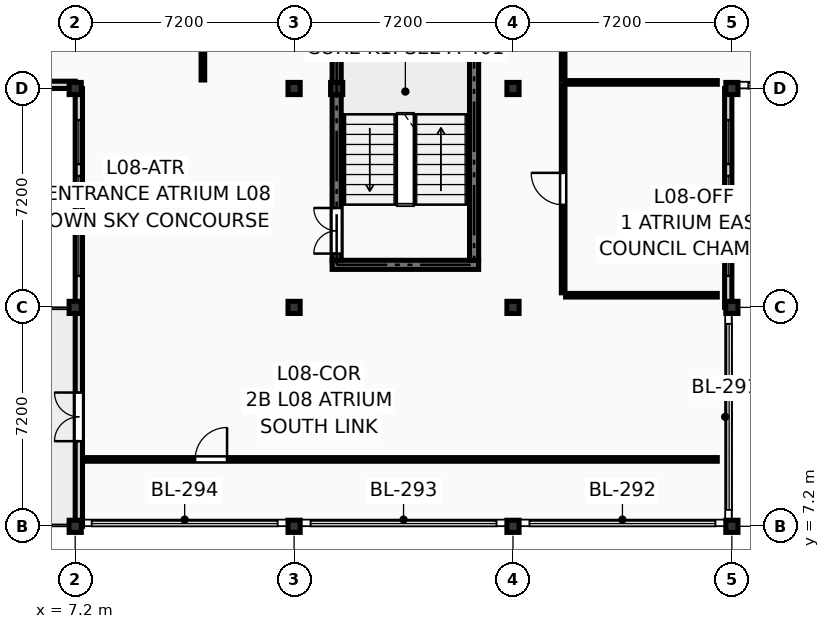
"""IFC4 building model, lengths in metres.
Left out: names, types, materials, properties, quantities, classifications, styles, units other than length and angle.
Written with IfcOpenShell. Run it as: python <this file> out.ifc"""

import sys

from ifc_helpers import new_model, si_unit, direction, frame, frame_2d, origin, origin_2d, place, context, subcontext, project, spatial, rectangle, extrude, element, fill, save


model = new_model("IFC4")
c1 = context("Model", 3, precision=1e-05, world=origin(), true_north=direction((0.0, 1.0)))
c2 = subcontext(c1, "Body", "Model", "MODEL_VIEW")
j1 = project(units=[si_unit("LENGTHUNIT", "METRE"), si_unit("PLANEANGLEUNIT", "RADIAN")], contexts=[c1])
p1 = place(None, origin())
s1 = spatial("IfcSite", under=j1, at=p1, CompositionType="ELEMENT")
p2 = place(p1, origin())
s2 = spatial("IfcBuilding", under=s1, at=p2, CompositionType="ELEMENT")
p3 = place(p2, frame((0.0, 0.0, 29.7)))
s3 = spatial("IfcBuildingStorey", under=s2, at=p3, CompositionType="ELEMENT", Elevation=29.7)
for number, where, z_axis, x_axis in (
    (1, (7.2, 7.2, 0.0), (0.0, 0.0, 1.0), (1.0, 0.0, 0.0)),
    (2, (7.2, 14.4, 0.0), (0.0, 0.0, 1.0), (1.0, 0.0, 0.0)),
    (3, (7.2, 21.6, 0.0), (0.0, 0.0, 1.0), (1.0, 0.0, 0.0)),
    (4, (14.4, 7.2, 0.0), (0.0, 0.0, 1.0), (1.0, 0.0, 0.0)),
    (5, (14.4, 14.4, 0.0), (0.0, 0.0, 1.0), (1.0, 0.0, 0.0)),
    (6, (14.4, 21.6, 0.0), (0.0, 0.0, 1.0), (1.0, 0.0, 0.0)),
    (7, (15.8, 21.6, 0.0), (0.0, 0.0, 1.0), (1.0, 0.0, 0.0)),
    (8, (21.6, 7.2, 0.0), (0.0, 0.0, 1.0), (1.0, 0.0, 0.0)),
    (9, (21.6, 14.4, 0.0), (0.0, 0.0, 1.0), (1.0, 0.0, 0.0)),
    (10, (21.6, 21.6, 0.0), (0.0, 0.0, 1.0), (1.0, 0.0, 0.0)),
    (11, (28.8, 7.2, 0.0), (0.0, 0.0, 1.0), (1.0, 0.0, 0.0)),
    (12, (28.8, 14.4, 0.0), (0.0, 0.0, 1.0), (1.0, 0.0, 0.0)),
    (13, (28.8, 21.6, 0.0), (0.0, 0.0, 1.0), (1.0, 0.0, 0.0)),
):
    element("IfcColumn", number, at=place(p3, frame(where, z_axis=z_axis, x_axis=x_axis)), inside=s3, PredefinedType="COLUMN", context=c2, shape_type="SweptSolid", body=[
        extrude(rectangle(XDim=0.4, YDim=0.4, at=origin_2d()), origin(), (0.0, 0.0, 1.0), 3.6),
    ])
p4 = place(p3, frame((7.32, 7.2, 0.0), z_axis=(0.0, 0.0, 1.0), x_axis=(0.0, 1.0, 0.0)))
e14 = element("IfcWall", 14, at=p4, inside=s3, PredefinedType="SOLIDWALL", context=c2, shape_type="SweptSolid", body=[
    extrude(rectangle(XDim=7.2, YDim=0.24, at=frame_2d((3.6, 0.0))), origin(), (0.0, 0.0, 1.0), 2.85),
])
p5 = place(p4, frame((2.8, 0.0, 0.0)))
e15 = element("IfcOpeningElement", 15, at=p5, cuts=e14, PredefinedType="OPENING", context=c2, shape_type="SweptSolid", body=[
    extrude(rectangle(XDim=1.6, YDim=2.25, at=frame_2d((0.8, 1.125))), frame((0.0, 0.132, 0.0), z_axis=(0.0, -1.0, 0.0), x_axis=(1.0, 0.0, 0.0)), (0.0, 0.0, 1.0), 0.264),
])
p6 = place(p3, frame((7.32, 14.4, 0.0), z_axis=(0.0, 0.0, 1.0), x_axis=(0.0, 1.0, 0.0)))
e16 = element("IfcWall", 16, at=p6, inside=s3, PredefinedType="SOLIDWALL", context=c2, shape_type="SweptSolid", body=[
    extrude(rectangle(XDim=7.2, YDim=0.24, at=frame_2d((3.6, 0.0))), origin(), (0.0, 0.0, 1.0), 2.85),
])
p7 = place(p6, frame((1.038, 0.0, 0.18)))
e17 = element("IfcOpeningElement", 17, at=p7, cuts=e16, PredefinedType="OPENING", context=c2, shape_type="SweptSolid", body=[
    extrude(rectangle(XDim=1.45, YDim=2.5, at=frame_2d((0.725, 1.25))), frame((0.0, 0.132, 0.0), z_axis=(0.0, -1.0, 0.0), x_axis=(1.0, 0.0, 0.0)), (0.0, 0.0, 1.0), 0.264),
])
p8 = place(p6, frame((2.875, 0.0, 0.18)))
e18 = element("IfcOpeningElement", 18, at=p8, cuts=e16, PredefinedType="OPENING", context=c2, shape_type="SweptSolid", body=[
    extrude(rectangle(XDim=1.45, YDim=2.5, at=frame_2d((0.725, 1.25))), frame((0.0, 0.132, 0.0), z_axis=(0.0, -1.0, 0.0), x_axis=(1.0, 0.0, 0.0)), (0.0, 0.0, 1.0), 0.264),
])
p9 = place(p6, frame((4.712, 0.0, 0.18)))
e19 = element("IfcOpeningElement", 19, at=p9, cuts=e16, PredefinedType="OPENING", context=c2, shape_type="SweptSolid", body=[
    extrude(rectangle(XDim=1.45, YDim=2.5, at=frame_2d((0.725, 1.25))), frame((0.0, 0.132, 0.0), z_axis=(0.0, -1.0, 0.0), x_axis=(1.0, 0.0, 0.0)), (0.0, 0.0, 1.0), 0.264),
])
p10 = place(p3, frame((1.8, 21.72, 0.0), z_axis=(0.0, 0.0, 1.0), x_axis=(1.0, 0.0, 0.0)))
e20 = element("IfcWall", 20, at=p10, inside=s3, PredefinedType="SOLIDWALL", context=c2, shape_type="SweptSolid", body=[
    extrude(rectangle(XDim=5.4, YDim=0.24, at=frame_2d((2.7, 0.0))), origin(), (0.0, 0.0, 1.0), 2.706),
])
p11 = place(p10, frame((1.15, 0.0, 0.18)))
e21 = element("IfcOpeningElement", 21, at=p11, cuts=e20, PredefinedType="OPENING", context=c2, shape_type="SweptSolid", body=[
    extrude(rectangle(XDim=1.3, YDim=2.35, at=frame_2d((0.65, 1.175))), frame((0.0, 0.132, 0.0), z_axis=(0.0, -1.0, 0.0), x_axis=(1.0, 0.0, 0.0)), (0.0, 0.0, 1.0), 0.264),
])
p12 = place(p10, frame((2.95, 0.0, 0.18)))
e22 = element("IfcOpeningElement", 22, at=p12, cuts=e20, PredefinedType="OPENING", context=c2, shape_type="SweptSolid", body=[
    extrude(rectangle(XDim=1.3, YDim=2.35, at=frame_2d((0.65, 1.175))), frame((0.0, 0.132, 0.0), z_axis=(0.0, -1.0, 0.0), x_axis=(1.0, 0.0, 0.0)), (0.0, 0.0, 1.0), 0.264),
])
p13 = place(p3, frame((28.68, 14.4, 0.0), z_axis=(0.0, 0.0, 1.0), x_axis=(0.0, 1.0, 0.0)))
e23 = element("IfcWall", 23, at=p13, inside=s3, PredefinedType="SOLIDWALL", context=c2, shape_type="SweptSolid", body=[
    extrude(rectangle(XDim=7.2, YDim=0.24, at=frame_2d((3.6, 0.0))), origin(), (0.0, 0.0, 1.0), 2.85),
])
p14 = place(p13, frame((1.038, 0.0, 0.18)))
e24 = element("IfcOpeningElement", 24, at=p14, cuts=e23, PredefinedType="OPENING", context=c2, shape_type="SweptSolid", body=[
    extrude(rectangle(XDim=1.45, YDim=2.5, at=frame_2d((0.725, 1.25))), frame((0.0, 0.132, 0.0), z_axis=(0.0, -1.0, 0.0), x_axis=(1.0, 0.0, 0.0)), (0.0, 0.0, 1.0), 0.264),
])
p15 = place(p13, frame((2.875, 0.0, 0.18)))
e25 = element("IfcOpeningElement", 25, at=p15, cuts=e23, PredefinedType="OPENING", context=c2, shape_type="SweptSolid", body=[
    extrude(rectangle(XDim=1.45, YDim=2.5, at=frame_2d((0.725, 1.25))), frame((0.0, 0.132, 0.0), z_axis=(0.0, -1.0, 0.0), x_axis=(1.0, 0.0, 0.0)), (0.0, 0.0, 1.0), 0.264),
])
p16 = place(p13, frame((4.712, 0.0, 0.18)))
e26 = element("IfcOpeningElement", 26, at=p16, cuts=e23, PredefinedType="OPENING", context=c2, shape_type="SweptSolid", body=[
    extrude(rectangle(XDim=1.45, YDim=2.5, at=frame_2d((0.725, 1.25))), frame((0.0, 0.132, 0.0), z_axis=(0.0, -1.0, 0.0), x_axis=(1.0, 0.0, 0.0)), (0.0, 0.0, 1.0), 0.264),
])
p17 = place(p3, frame((15.65, 15.8, 0.0), z_axis=(0.0, 0.0, 1.0), x_axis=(1.0, 0.0, 0.0)))
e27 = element("IfcWall", 27, at=p17, inside=s3, PredefinedType="SHEAR", context=c2, shape_type="SweptSolid", body=[
    extrude(rectangle(XDim=4.82, YDim=0.3, at=frame_2d((2.41, 0.0))), origin(), (0.0, 0.0, 1.0), 3.4),
])
p18 = place(p3, frame((15.8, 15.95, 0.0), z_axis=(0.0, 0.0, 1.0), x_axis=(0.0, 1.0, 0.0)))
e28 = element("IfcWall", 28, at=p18, inside=s3, PredefinedType="SHEAR", context=c2, shape_type="SweptSolid", body=[
    extrude(rectangle(XDim=7.7, YDim=0.3, at=frame_2d((3.85, 0.0))), origin(), (0.0, 0.0, 1.0), 3.4),
])
p19 = place(p18, frame((0.22, 0.0, 0.0)))
e29 = element("IfcOpeningElement", 29, at=p19, cuts=e28, PredefinedType="OPENING", context=c2, shape_type="SweptSolid", body=[
    extrude(rectangle(XDim=1.5, YDim=2.2, at=frame_2d((0.75, 1.1))), frame((0.0, 0.162, 0.0), z_axis=(0.0, -1.0, 0.0), x_axis=(1.0, 0.0, 0.0)), (0.0, 0.0, 1.0), 0.324),
])
p20 = place(p3, frame((20.32, 15.95, 0.0), z_axis=(0.0, 0.0, 1.0), x_axis=(0.0, 1.0, 0.0)))
e30 = element("IfcWall", 30, at=p20, inside=s3, PredefinedType="SHEAR", context=c2, shape_type="SweptSolid", body=[
    extrude(rectangle(XDim=7.7, YDim=0.3, at=frame_2d((3.85, 0.0))), origin(), (0.0, 0.0, 1.0), 3.4),
])
p21 = place(p3, frame((7.53, 9.4, 0.0), z_axis=(0.0, 0.0, 1.0), x_axis=(1.0, 0.0, 0.0)))
e31 = element("IfcWall", 31, at=p21, inside=s3, PredefinedType="PARTITIONING", context=c2, shape_type="SweptSolid", body=[
    extrude(rectangle(XDim=20.79, YDim=0.12, at=frame_2d((10.395, 0.0))), origin(), (0.0, 0.0, 1.0), 3.385),
])
p22 = place(p21, frame((3.615, 0.0, 0.0)))
e32 = element("IfcOpeningElement", 32, at=p22, cuts=e31, PredefinedType="OPENING", context=c2, shape_type="SweptSolid", body=[
    extrude(rectangle(XDim=1.05, YDim=2.18, at=frame_2d((0.525, 1.09))), frame((0.0, 0.072, 0.0), z_axis=(0.0, -1.0, 0.0), x_axis=(1.0, 0.0, 0.0)), (0.0, 0.0, 1.0), 0.144),
])
p23 = place(p3, frame((11.4, 21.88, 0.0), z_axis=(0.0, 0.0, 1.0), x_axis=(0.0, 1.0, 0.0)))
e33 = element("IfcWall", 33, at=p23, inside=s3, PredefinedType="PARTITIONING", context=c2, shape_type="SweptSolid", body=[
    extrude(rectangle(XDim=26.99, YDim=0.12, at=frame_2d((13.495, 0.0))), origin(), (0.0, 0.0, 1.0), 3.385),
])
p24 = place(p23, frame((12.895, 0.0, 0.0)))
e34 = element("IfcOpeningElement", 34, at=p24, cuts=e33, PredefinedType="OPENING", context=c2, shape_type="SweptSolid", body=[
    extrude(rectangle(XDim=1.2, YDim=2.15, at=frame_2d((0.6, 1.075))), frame((0.0, 0.072, 0.0), z_axis=(0.0, -1.0, 0.0), x_axis=(1.0, 0.0, 0.0)), (0.0, 0.0, 1.0), 0.144),
])
p25 = place(p3, frame((23.25, 14.88, 0.0), z_axis=(0.0, 0.0, 1.0), x_axis=(0.0, 1.0, 0.0)))
e35 = element("IfcWall", 35, at=p25, inside=s3, PredefinedType="PARTITIONING", context=c2, shape_type="SweptSolid", body=[
    extrude(rectangle(XDim=6.84, YDim=0.12, at=frame_2d((3.42, 0.0))), origin(), (0.0, 0.0, 1.0), 3.385),
])
p26 = place(p25, frame((2.895, 0.0, 0.0)))
e36 = element("IfcOpeningElement", 36, at=p26, cuts=e35, PredefinedType="OPENING", context=c2, shape_type="SweptSolid", body=[
    extrude(rectangle(XDim=1.05, YDim=2.18, at=frame_2d((0.525, 1.09))), frame((0.0, 0.072, 0.0), z_axis=(0.0, -1.0, 0.0), x_axis=(1.0, 0.0, 0.0)), (0.0, 0.0, 1.0), 0.144),
])
p27 = place(p3, frame((23.33, 14.8, 0.0), z_axis=(0.0, 0.0, 1.0), x_axis=(1.0, 0.0, 0.0)))
e37 = element("IfcWall", 37, at=p27, inside=s3, PredefinedType="PARTITIONING", context=c2, shape_type="SweptSolid", body=[
    extrude(rectangle(XDim=4.99, YDim=0.12, at=frame_2d((2.495, 0.0))), origin(), (0.0, 0.0, 1.0), 3.385),
])
p28 = place(p3, frame((23.33, 21.8, 0.0), z_axis=(0.0, 0.0, 1.0), x_axis=(1.0, 0.0, 0.0)))
e38 = element("IfcWall", 38, at=p28, inside=s3, PredefinedType="PARTITIONING", context=c2, shape_type="SweptSolid", body=[
    extrude(rectangle(XDim=4.99, YDim=0.12, at=frame_2d((2.495, 0.0))), origin(), (0.0, 0.0, 1.0), 2.701),
])
p29 = place(p3, frame((23.25, 21.88, 0.0), z_axis=(0.0, 0.0, 1.0), x_axis=(0.0, 1.0, 0.0)))
e39 = element("IfcWall", 39, at=p29, inside=s3, PredefinedType="PARTITIONING", context=c2, shape_type="SweptSolid", body=[
    extrude(rectangle(XDim=13.84, YDim=0.12, at=frame_2d((6.92, 0.0))), origin(), (0.0, 0.0, 1.0), 3.385),
])
p30 = place(p29, frame((3.876, 0.0, 0.0)))
e40 = element("IfcOpeningElement", 40, at=p30, cuts=e39, PredefinedType="OPENING", context=c2, shape_type="SweptSolid", body=[
    extrude(rectangle(XDim=1.7, YDim=2.28, at=frame_2d((0.85, 1.14))), frame((0.0, 0.072, 0.0), z_axis=(0.0, -1.0, 0.0), x_axis=(1.0, 0.0, 0.0)), (0.0, 0.0, 1.0), 0.144),
])
p31 = place(p5, origin())
e41 = element("IfcDoor", 41, at=p31, inside=s3, OperationType="DOUBLE_DOOR_SINGLE_SWING", PredefinedType="DOOR", context=c2, shape_type="SweptSolid", body=[
    extrude(rectangle(XDim=1.6, YDim=2.25, at=frame_2d((0.8, 1.125))), frame((0.0, 0.025, 0.0), z_axis=(0.0, -1.0, 0.0), x_axis=(1.0, 0.0, 0.0)), (0.0, 0.0, 1.0), 0.05),
])
fill(e15, e41)
p32 = place(p7, origin())
e42 = element("IfcWindow", 42, at=p32, inside=s3, PartitioningType="SINGLE_PANEL", PredefinedType="WINDOW", context=c2, shape_type="SweptSolid", body=[
    extrude(rectangle(XDim=1.45, YDim=2.5, at=frame_2d((0.725, 1.25))), frame((0.0, 0.03, 0.0), z_axis=(0.0, -1.0, 0.0), x_axis=(1.0, 0.0, 0.0)), (0.0, 0.0, 1.0), 0.06),
])
fill(e17, e42)
p33 = place(p8, origin())
e43 = element("IfcWindow", 43, at=p33, inside=s3, PartitioningType="SINGLE_PANEL", PredefinedType="WINDOW", context=c2, shape_type="SweptSolid", body=[
    extrude(rectangle(XDim=1.45, YDim=2.5, at=frame_2d((0.725, 1.25))), frame((0.0, 0.03, 0.0), z_axis=(0.0, -1.0, 0.0), x_axis=(1.0, 0.0, 0.0)), (0.0, 0.0, 1.0), 0.06),
])
fill(e18, e43)
p34 = place(p9, origin())
e44 = element("IfcWindow", 44, at=p34, inside=s3, PartitioningType="SINGLE_PANEL", PredefinedType="WINDOW", context=c2, shape_type="SweptSolid", body=[
    extrude(rectangle(XDim=1.45, YDim=2.5, at=frame_2d((0.725, 1.25))), frame((0.0, 0.03, 0.0), z_axis=(0.0, -1.0, 0.0), x_axis=(1.0, 0.0, 0.0)), (0.0, 0.0, 1.0), 0.06),
])
fill(e19, e44)
p35 = place(p14, origin())
e45 = element("IfcWindow", 45, at=p35, inside=s3, PartitioningType="SINGLE_PANEL", PredefinedType="WINDOW", context=c2, shape_type="SweptSolid", body=[
    extrude(rectangle(XDim=1.45, YDim=2.5, at=frame_2d((0.725, 1.25))), frame((0.0, 0.03, 0.0), z_axis=(0.0, -1.0, 0.0), x_axis=(1.0, 0.0, 0.0)), (0.0, 0.0, 1.0), 0.06),
])
fill(e24, e45)
p36 = place(p15, origin())
e46 = element("IfcWindow", 46, at=p36, inside=s3, PartitioningType="SINGLE_PANEL", PredefinedType="WINDOW", context=c2, shape_type="SweptSolid", body=[
    extrude(rectangle(XDim=1.45, YDim=2.5, at=frame_2d((0.725, 1.25))), frame((0.0, 0.03, 0.0), z_axis=(0.0, -1.0, 0.0), x_axis=(1.0, 0.0, 0.0)), (0.0, 0.0, 1.0), 0.06),
])
fill(e25, e46)
p37 = place(p16, origin())
e47 = element("IfcWindow", 47, at=p37, inside=s3, PartitioningType="SINGLE_PANEL", PredefinedType="WINDOW", context=c2, shape_type="SweptSolid", body=[
    extrude(rectangle(XDim=1.45, YDim=2.5, at=frame_2d((0.725, 1.25))), frame((0.0, 0.03, 0.0), z_axis=(0.0, -1.0, 0.0), x_axis=(1.0, 0.0, 0.0)), (0.0, 0.0, 1.0), 0.06),
])
fill(e26, e47)
p38 = place(p19, origin())
e48 = element("IfcDoor", 48, at=p38, inside=s3, OperationType="DOUBLE_DOOR_SINGLE_SWING", PredefinedType="DOOR", context=c2, shape_type="SweptSolid", body=[
    extrude(rectangle(XDim=1.5, YDim=2.2, at=frame_2d((0.75, 1.1))), frame((0.0, 0.025, 0.0), z_axis=(0.0, -1.0, 0.0), x_axis=(1.0, 0.0, 0.0)), (0.0, 0.0, 1.0), 0.05),
])
fill(e29, e48)
p39 = place(p22, origin())
e49 = element("IfcDoor", 49, at=p39, inside=s3, OperationType="SINGLE_SWING_RIGHT", PredefinedType="DOOR", context=c2, shape_type="SweptSolid", body=[
    extrude(rectangle(XDim=1.05, YDim=2.18, at=frame_2d((0.525, 1.09))), frame((0.0, 0.025, 0.0), z_axis=(0.0, -1.0, 0.0), x_axis=(1.0, 0.0, 0.0)), (0.0, 0.0, 1.0), 0.05),
])
fill(e32, e49)
p40 = place(p26, origin())
e50 = element("IfcDoor", 50, at=p40, inside=s3, OperationType="SINGLE_SWING_RIGHT", PredefinedType="DOOR", context=c2, shape_type="SweptSolid", body=[
    extrude(rectangle(XDim=1.05, YDim=2.18, at=frame_2d((0.525, 1.09))), frame((0.0, 0.025, 0.0), z_axis=(0.0, -1.0, 0.0), x_axis=(1.0, 0.0, 0.0)), (0.0, 0.0, 1.0), 0.05),
])
fill(e36, e50)
save(model, sys.argv[1])
